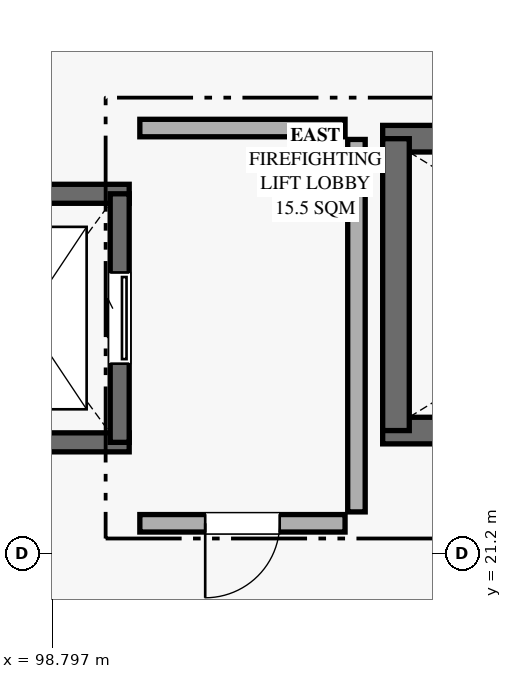
"""IFC4 building model, lengths in metres.
Left out: names, types, materials, properties, quantities, classifications, styles, units other than length and angle.
Written with IfcOpenShell. Run it as: python <this file> out.ifc"""

import sys

from ifc_helpers import new_model, si_unit, direction, frame, frame_2d, origin, place, context, subcontext, project, spatial, rectangle, extrude, element, fill, save


model = new_model("IFC4")
c1 = context("Model", 3, precision=1e-05, world=origin(), true_north=direction((0.0, 1.0)))
c2 = subcontext(c1, "Body", "Model", "MODEL_VIEW")
j1 = project(units=[si_unit("LENGTHUNIT", "METRE"), si_unit("PLANEANGLEUNIT", "RADIAN")], contexts=[c1])
p1 = place(None, origin())
s1 = spatial("IfcSite", under=j1, at=p1, CompositionType="ELEMENT")
p2 = place(p1, origin())
s2 = spatial("IfcBuilding", under=s1, at=p2, CompositionType="ELEMENT")
p3 = place(p2, frame((0.0, 0.0, 33.3)))
s3 = spatial("IfcBuildingStorey", under=s2, at=p3, CompositionType="ELEMENT", Elevation=33.3)
for number, where, z_axis, x_axis in (
    (1, (111.155, 22.82, 0.0), (0.0, 0.0, 1.0), (-1.0, 0.0, 0.0)),
    (2, (103.145, 26.66, 0.0), (0.0, 0.0, 1.0), (1.0, 0.0, 0.0)),
):
    element("IfcWall", number, at=place(p3, frame(where, z_axis=z_axis, x_axis=x_axis)), inside=s3, PredefinedType="SHEAR", context=c2, shape_type="SweptSolid", body=[
        extrude(rectangle(XDim=8.01, YDim=0.35, at=frame_2d((4.005, 0.0))), origin(), (0.0, 0.0, 1.0), 4.05),
    ])
p4 = place(p3, frame((103.32, 22.82, 0.0), z_axis=(0.0, 0.0, 1.0), x_axis=(0.0, 1.0, 0.0)))
e3 = element("IfcWall", 3, at=p4, inside=s3, PredefinedType="SHEAR", context=c2, shape_type="SweptSolid", body=[
    extrude(rectangle(XDim=3.84, YDim=0.35, at=frame_2d((1.92, 0.0))), origin(), (0.0, 0.0, 1.0), 4.05),
])
for number, where, z_axis, x_axis in (
    (4, (99.81, 22.665, 0.0), (0.0, 0.0, 1.0), (-1.0, 0.0, 0.0)),
    (5, (97.09, 25.935, 0.0), (0.0, 0.0, 1.0), (1.0, 0.0, 0.0)),
):
    element("IfcWall", number, at=place(p3, frame(where, z_axis=z_axis, x_axis=x_axis)), inside=s3, PredefinedType="SHEAR", context=c2, shape_type="SweptSolid", body=[
        extrude(rectangle(XDim=2.72, YDim=0.25, at=frame_2d((1.36, 0.0))), origin(), (0.0, 0.0, 1.0), 4.05),
    ])
p5 = place(p3, frame((99.685, 25.935, 0.0), z_axis=(0.0, 0.0, 1.0), x_axis=(0.0, -1.0, 0.0)))
e6 = element("IfcWall", 6, at=p5, inside=s3, PredefinedType="SHEAR", context=c2, shape_type="SweptSolid", body=[
    extrude(rectangle(XDim=3.27, YDim=0.25, at=frame_2d((1.635, 0.0))), origin(), (0.0, 0.0, 1.0), 4.05),
])
p6 = place(p5, frame((1.035, 0.0, 0.0)))
e7 = element("IfcOpeningElement", 7, at=p6, cuts=e6, PredefinedType="OPENING", context=c2, shape_type="SweptSolid", body=[
    extrude(rectangle(XDim=1.2, YDim=2.25, at=frame_2d((0.6, 1.125))), frame((0.0, 0.135, 0.0), z_axis=(0.0, -1.0, 0.0), x_axis=(1.0, 0.0, 0.0)), (0.0, 0.0, 1.0), 0.27),
])
p7 = place(p3, frame((102.65, 21.6, 0.0), z_axis=(0.0, 0.0, 1.0), x_axis=(-1.0, 0.0, 0.0)))
e8 = element("IfcWall", 8, at=p7, inside=s3, PredefinedType="PARTITIONING", context=c2, shape_type="SweptSolid", body=[
    extrude(rectangle(XDim=2.7, YDim=0.23, at=frame_2d((1.35, 0.0))), origin(), (0.0, 0.0, 1.0), 2.8),
])
p8 = place(p7, frame((0.86, 0.0, 0.0)))
e9 = element("IfcOpeningElement", 9, at=p8, cuts=e8, PredefinedType="OPENING", context=c2, shape_type="SweptSolid", body=[
    extrude(rectangle(XDim=0.98, YDim=2.06, at=frame_2d((0.49, 1.03))), frame((0.0, 0.125, 0.0), z_axis=(0.0, -1.0, 0.0), x_axis=(1.0, 0.0, 0.0)), (0.0, 0.0, 1.0), 0.25),
])
p9 = place(p3, frame((99.95, 26.8, 0.0), z_axis=(0.0, 0.0, 1.0), x_axis=(1.0, 0.0, 0.0)))
e10 = element("IfcWall", 10, at=p9, inside=s3, PredefinedType="PARTITIONING", context=c2, shape_type="SweptSolid", body=[
    extrude(rectangle(XDim=2.7, YDim=0.23, at=frame_2d((1.35, 0.0))), origin(), (0.0, 0.0, 1.0), 2.8),
])
p10 = place(p3, frame((102.8, 26.65, 0.0), z_axis=(0.0, 0.0, 1.0), x_axis=(0.0, -1.0, 0.0)))
e11 = element("IfcWall", 11, at=p10, inside=s3, PredefinedType="PARTITIONING", context=c2, shape_type="SweptSolid", body=[
    extrude(rectangle(XDim=4.9, YDim=0.23, at=frame_2d((2.45, 0.0))), origin(), (0.0, 0.0, 1.0), 2.8),
])
p11 = place(p6, origin())
e12 = element("IfcDoor", 12, at=p11, inside=s3, OperationType="SLIDING_TO_LEFT", PredefinedType="DOOR", context=c2, shape_type="SweptSolid", body=[
    extrude(rectangle(XDim=1.2, YDim=2.25, at=frame_2d((0.6, 1.125))), frame((0.0, 0.025, 0.0), z_axis=(0.0, -1.0, 0.0), x_axis=(1.0, 0.0, 0.0)), (0.0, 0.0, 1.0), 0.05),
])
fill(e7, e12)
p12 = place(p8, origin())
e13 = element("IfcDoor", 13, at=p12, inside=s3, OperationType="SINGLE_SWING_RIGHT", PredefinedType="DOOR", context=c2, shape_type="SweptSolid", body=[
    extrude(rectangle(XDim=0.98, YDim=2.06, at=frame_2d((0.49, 1.03))), frame((0.0, 0.025, 0.0), z_axis=(0.0, -1.0, 0.0), x_axis=(1.0, 0.0, 0.0)), (0.0, 0.0, 1.0), 0.05),
])
fill(e9, e13)
save(model, sys.argv[1])
